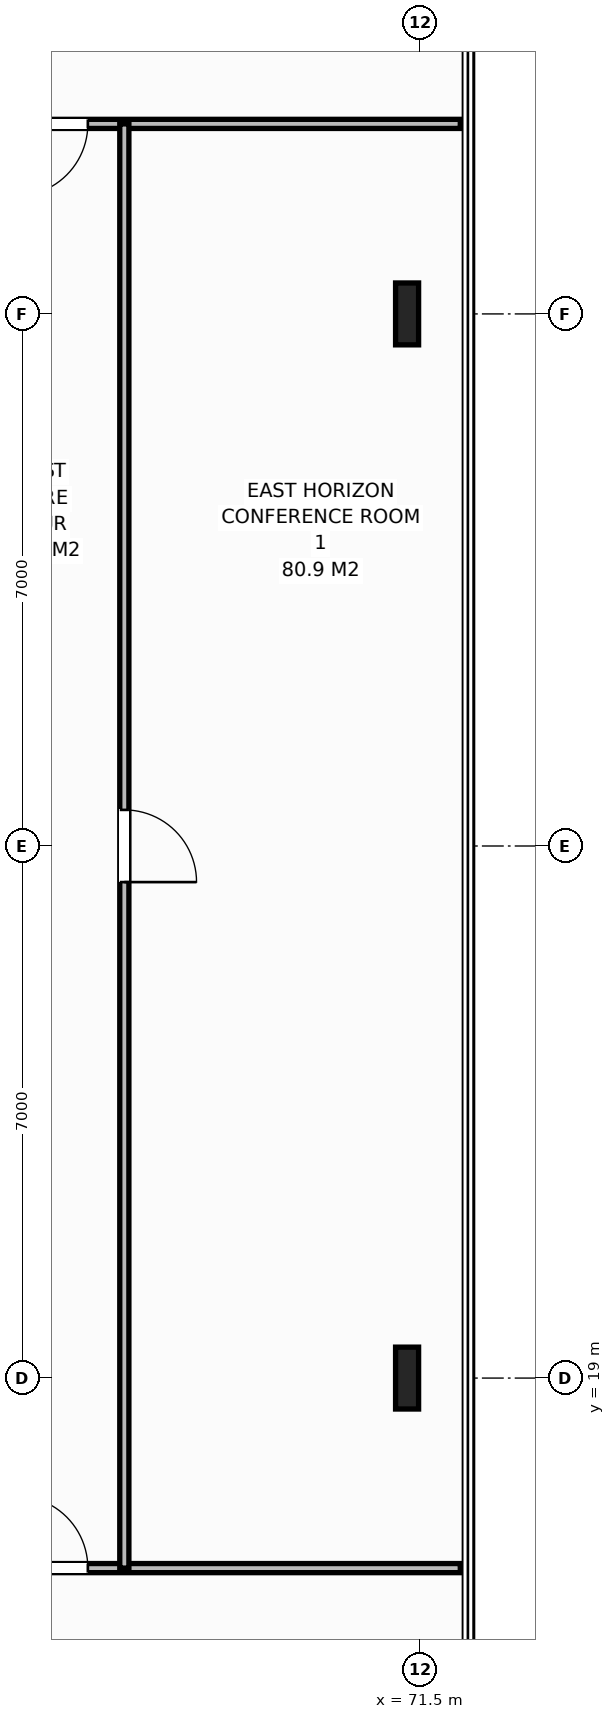
"""IFC4 building model, lengths in metres.
Left out: names, types, materials, properties, quantities, classifications, styles, units other than length and angle.
Written with IfcOpenShell. Run it as: python <this file> out.ifc"""

import sys

from ifc_helpers import new_model, si_unit, direction, frame, frame_2d, origin, origin_2d, place, context, subcontext, project, spatial, rectangle, i_section, extrude, element, fill, save


model = new_model("IFC4")
c1 = context("Model", 3, precision=1e-05, world=origin(), true_north=direction((0.0, 1.0)))
c2 = subcontext(c1, "Body", "Model", "MODEL_VIEW")
j1 = project(units=[si_unit("LENGTHUNIT", "METRE"), si_unit("PLANEANGLEUNIT", "RADIAN")], contexts=[c1])
p1 = place(None, origin())
s1 = spatial("IfcSite", under=j1, at=p1, CompositionType="ELEMENT")
p2 = place(p1, origin())
s2 = spatial("IfcBuilding", under=s1, at=p2, CompositionType="ELEMENT")
p3 = place(p2, frame((0.0, 0.0, 248.0)))
s3 = spatial("IfcBuildingStorey", under=s2, at=p3, CompositionType="ELEMENT", Elevation=248.0)
for number, where, z_axis, x_axis in (
    (1, (71.32, 19.0, 0.0), (0.0, 0.0, 1.0), (1.0, 0.0, 0.0)),
    (2, (71.32, 33.0, 0.0), (0.0, 0.0, 1.0), (1.0, 0.0, 0.0)),
):
    element("IfcColumn", number, at=place(p3, frame(where, z_axis=z_axis, x_axis=x_axis)), inside=s3, PredefinedType="COLUMN", context=c2, shape_type="SweptSolid", body=[
        extrude(i_section(OverallWidth=0.303, OverallDepth=0.814, WebThickness=0.021, FlangeThickness=0.04, at=origin_2d()), origin(), (0.0, 0.0, 1.0), 3.8),
    ])
p4 = place(p3, frame((64.86, 35.5, 0.0), z_axis=(0.0, 0.0, 1.0), x_axis=(1.0, 0.0, 0.0)))
e3 = element("IfcWall", 3, at=p4, inside=s3, PredefinedType="PARTITIONING", context=c2, shape_type="SweptSolid", body=[
    extrude(rectangle(XDim=7.16, YDim=0.12, at=frame_2d((3.58, 0.0))), origin(), (0.0, 0.0, 1.0), 3.58),
])
p5 = place(p4, frame((1.31, 0.0, 0.0)))
e4 = element("IfcOpeningElement", 4, at=p5, cuts=e3, PredefinedType="OPENING", context=c2, shape_type="SweptSolid", body=[
    extrude(rectangle(XDim=0.95, YDim=2.15, at=frame_2d((0.475, 1.075))), frame((0.0, 0.07, 0.0), z_axis=(0.0, -1.0, 0.0), x_axis=(1.0, 0.0, 0.0)), (0.0, 0.0, 1.0), 0.14),
])
p6 = place(p3, frame((64.063, 16.5, 0.0), z_axis=(0.0, 0.0, 1.0), x_axis=(1.0, 0.0, 0.0)))
e5 = element("IfcWall", 5, at=p6, inside=s3, PredefinedType="PARTITIONING", context=c2, shape_type="SweptSolid", body=[
    extrude(rectangle(XDim=7.957, YDim=0.12, at=frame_2d((3.979, 0.0))), origin(), (0.0, 0.0, 1.0), 3.58),
])
p7 = place(p6, frame((2.107, 0.0, 0.0)))
e6 = element("IfcOpeningElement", 6, at=p7, cuts=e5, PredefinedType="OPENING", context=c2, shape_type="SweptSolid", body=[
    extrude(rectangle(XDim=0.95, YDim=2.15, at=frame_2d((0.475, 1.075))), frame((0.0, 0.07, 0.0), z_axis=(0.0, -1.0, 0.0), x_axis=(1.0, 0.0, 0.0)), (0.0, 0.0, 1.0), 0.14),
])
p8 = place(p3, frame((67.6, 16.5, 0.0), z_axis=(0.0, 0.0, 1.0), x_axis=(0.0, 1.0, 0.0)))
e7 = element("IfcWall", 7, at=p8, inside=s3, PredefinedType="PARTITIONING", context=c2, shape_type="SweptSolid", body=[
    extrude(rectangle(XDim=19.0, YDim=0.12, at=frame_2d((9.5, 0.0))), origin(), (0.0, 0.0, 1.0), 3.58),
])
p9 = place(p8, frame((9.025, 0.0, 0.0)))
e8 = element("IfcOpeningElement", 8, at=p9, cuts=e7, PredefinedType="OPENING", context=c2, shape_type="SweptSolid", body=[
    extrude(rectangle(XDim=0.95, YDim=2.15, at=frame_2d((0.475, 1.075))), frame((0.0, 0.07, 0.0), z_axis=(0.0, -1.0, 0.0), x_axis=(1.0, 0.0, 0.0)), (0.0, 0.0, 1.0), 0.14),
])
p10 = place(p5, origin())
e9 = element("IfcDoor", 9, at=p10, inside=s3, OperationType="SINGLE_SWING_RIGHT", PredefinedType="DOOR", context=c2, shape_type="SweptSolid", body=[
    extrude(rectangle(XDim=0.95, YDim=2.15, at=frame_2d((0.475, 1.075))), frame((0.0, 0.025, 0.0), z_axis=(0.0, -1.0, 0.0), x_axis=(1.0, 0.0, 0.0)), (0.0, 0.0, 1.0), 0.05),
])
fill(e4, e9)
p11 = place(p7, origin())
e10 = element("IfcDoor", 10, at=p11, inside=s3, OperationType="SINGLE_SWING_LEFT", PredefinedType="DOOR", context=c2, shape_type="SweptSolid", body=[
    extrude(rectangle(XDim=0.95, YDim=2.15, at=frame_2d((0.475, 1.075))), frame((0.0, 0.025, 0.0), z_axis=(0.0, -1.0, 0.0), x_axis=(1.0, 0.0, 0.0)), (0.0, 0.0, 1.0), 0.05),
])
fill(e6, e10)
p12 = place(p9, origin())
e11 = element("IfcDoor", 11, at=p12, inside=s3, OperationType="SINGLE_SWING_RIGHT", PredefinedType="DOOR", context=c2, shape_type="SweptSolid", body=[
    extrude(rectangle(XDim=0.95, YDim=2.15, at=frame_2d((0.475, 1.075))), frame((0.0, 0.025, 0.0), z_axis=(0.0, -1.0, 0.0), x_axis=(1.0, 0.0, 0.0)), (0.0, 0.0, 1.0), 0.05),
])
fill(e8, e11)
save(model, sys.argv[1])
